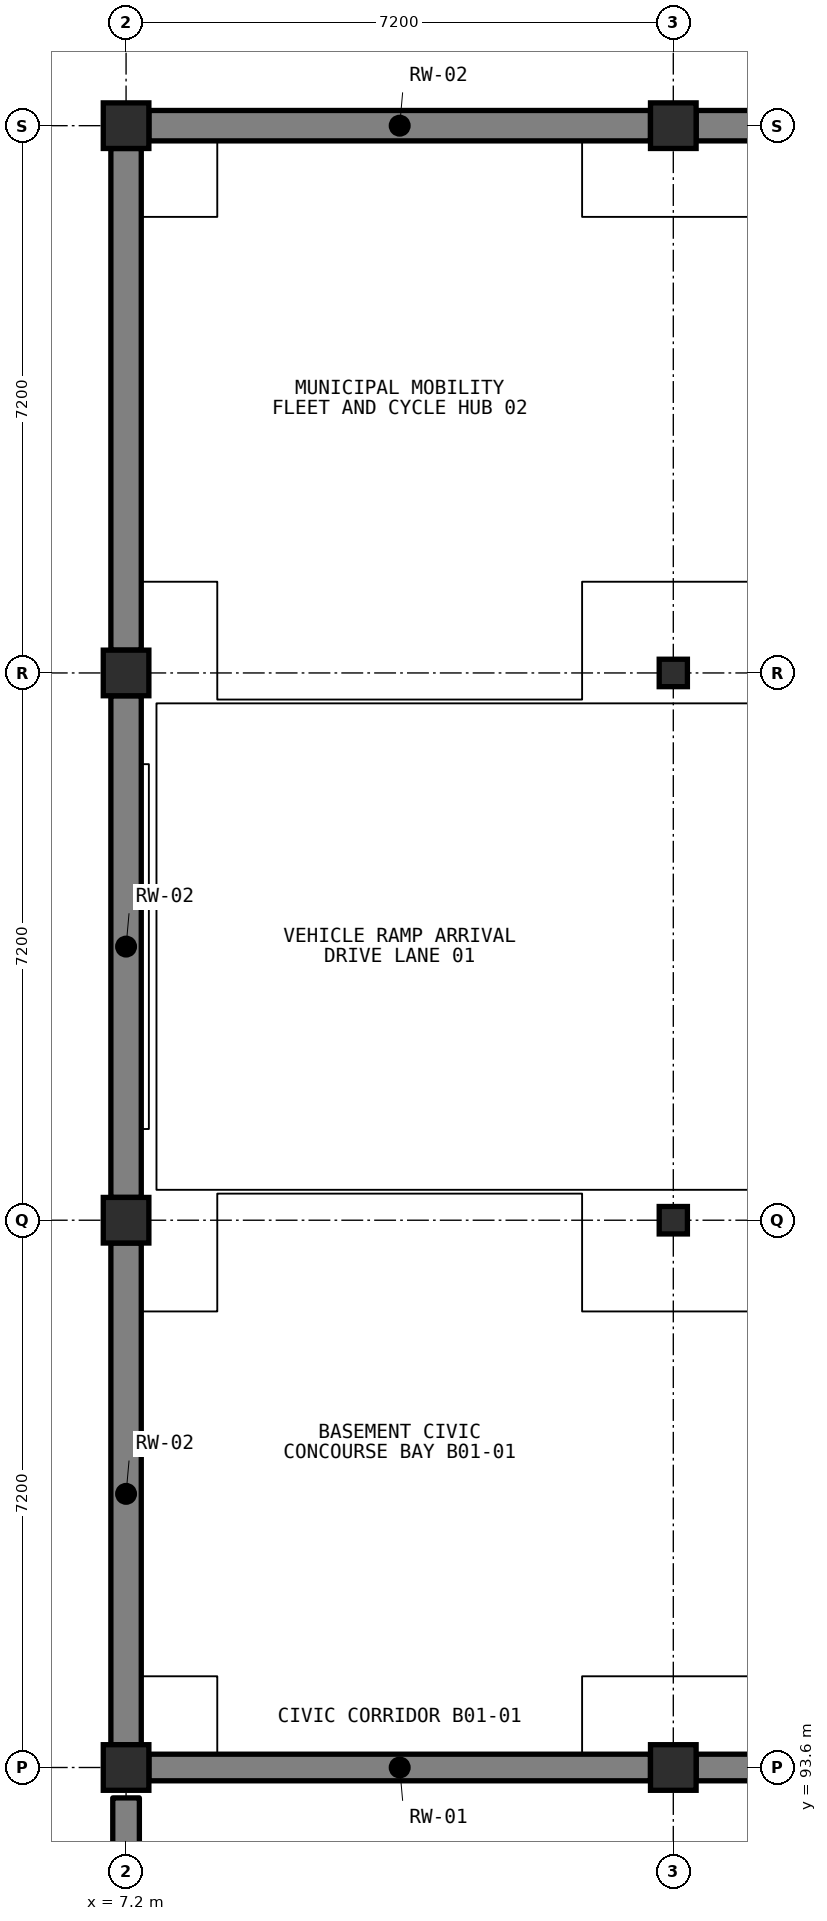
"""IFC4 building model, lengths in metres.
Left out: names, types, materials, properties, quantities, classifications, styles, units other than length and angle.
Written with IfcOpenShell. Run it as: python <this file> out.ifc"""

import sys

from ifc_helpers import new_model, si_unit, direction, frame, frame_2d, origin, origin_2d, place, context, subcontext, project, spatial, rectangle, i_section, extrude, element, save


model = new_model("IFC4")
c1 = context("Model", 3, precision=1e-05, world=origin(), true_north=direction((0.0, 1.0)))
c2 = subcontext(c1, "Body", "Model", "MODEL_VIEW")
j1 = project(units=[si_unit("LENGTHUNIT", "METRE"), si_unit("PLANEANGLEUNIT", "RADIAN")], contexts=[c1])
p1 = place(None, origin())
s1 = spatial("IfcSite", under=j1, at=p1, CompositionType="ELEMENT")
p2 = place(p1, origin())
s2 = spatial("IfcBuilding", under=s1, at=p2, CompositionType="ELEMENT")
p3 = place(p2, frame((0.0, 0.0, -4.2)))
s3 = spatial("IfcBuildingStorey", under=s2, at=p3, CompositionType="ELEMENT", Elevation=-4.2)
p4 = place(p3, frame((7.5, 93.6, 0.0), z_axis=(0.0, 0.0, 1.0), x_axis=(1.0, 0.0, 0.0)))
e1 = element("IfcWall", 1, at=p4, inside=s3, PredefinedType="USERDEFINED", context=c2, shape_type="SweptSolid", body=[
    extrude(rectangle(XDim=6.6, YDim=0.35, at=frame_2d((3.3, 0.0))), origin(), (0.0, 0.0, 1.0), 3.98),
])
p5 = place(p3, frame((7.2, 93.9, 0.0), z_axis=(0.0, 0.0, 1.0), x_axis=(0.0, 1.0, 0.0)))
e2 = element("IfcWall", 2, at=p5, inside=s3, PredefinedType="USERDEFINED", context=c2, shape_type="SweptSolid", body=[
    extrude(rectangle(XDim=6.6, YDim=0.4, at=frame_2d((3.3, 0.0))), origin(), (0.0, 0.0, 1.0), 3.98),
])
p6 = place(p3, frame((7.2, 101.1, 0.0), z_axis=(0.0, 0.0, 1.0), x_axis=(0.0, 1.0, 0.0)))
e3 = element("IfcWall", 3, at=p6, inside=s3, PredefinedType="USERDEFINED", context=c2, shape_type="SweptSolid", body=[
    extrude(rectangle(XDim=6.6, YDim=0.4, at=frame_2d((3.3, 0.0))), origin(), (0.0, 0.0, 1.0), 3.98),
])
p7 = place(p3, frame((7.5, 115.2, 0.0), z_axis=(0.0, 0.0, 1.0), x_axis=(1.0, 0.0, 0.0)))
e4 = element("IfcWall", 4, at=p7, inside=s3, PredefinedType="USERDEFINED", context=c2, shape_type="SweptSolid", body=[
    extrude(rectangle(XDim=6.6, YDim=0.4, at=frame_2d((3.3, 0.0))), origin(), (0.0, 0.0, 1.0), 3.98),
])
p8 = place(p3, frame((7.2, 108.3, 0.0), z_axis=(0.0, 0.0, 1.0), x_axis=(0.0, 1.0, 0.0)))
e5 = element("IfcWall", 5, at=p8, inside=s3, PredefinedType="USERDEFINED", context=c2, shape_type="SweptSolid", body=[
    extrude(rectangle(XDim=6.6, YDim=0.4, at=frame_2d((3.3, 0.0))), origin(), (0.0, 0.0, 1.0), 3.98),
])
p9 = place(p3, frame((14.7, 93.6, 0.0), z_axis=(0.0, 0.0, 1.0), x_axis=(1.0, 0.0, 0.0)))
e6 = element("IfcWall", 6, at=p9, inside=s3, PredefinedType="USERDEFINED", context=c2, shape_type="SweptSolid", body=[
    extrude(rectangle(XDim=6.6, YDim=0.35, at=frame_2d((3.3, 0.0))), origin(), (0.0, 0.0, 1.0), 3.98),
])
p10 = place(p3, frame((14.7, 115.2, 0.0), z_axis=(0.0, 0.0, 1.0), x_axis=(1.0, 0.0, 0.0)))
e7 = element("IfcWall", 7, at=p10, inside=s3, PredefinedType="USERDEFINED", context=c2, shape_type="SweptSolid", body=[
    extrude(rectangle(XDim=6.6, YDim=0.4, at=frame_2d((3.3, 0.0))), origin(), (0.0, 0.0, 1.0), 3.98),
])
p11 = place(p3, frame((7.2, 86.8, 0.0), z_axis=(0.0, 0.0, 1.0), x_axis=(0.0, 1.0, 0.0)))
e8 = element("IfcWall", 8, at=p11, inside=s3, PredefinedType="USERDEFINED", context=c2, shape_type="SweptSolid", body=[
    extrude(rectangle(XDim=6.4, YDim=0.35, at=frame_2d((3.2, 0.0))), origin(), (0.0, 0.0, 1.0), 3.98),
])
for number, where, z_axis, x_axis in (
    (9, (7.2, 93.6, 0.0), (0.0, 0.0, 1.0), (1.0, 0.0, 0.0)),
    (10, (7.2, 100.8, 0.0), (0.0, 0.0, 1.0), (1.0, 0.0, 0.0)),
    (11, (7.2, 108.0, 0.0), (0.0, 0.0, 1.0), (1.0, 0.0, 0.0)),
    (12, (7.2, 115.2, 0.0), (0.0, 0.0, 1.0), (1.0, 0.0, 0.0)),
    (13, (14.4, 93.6, 0.0), (0.0, 0.0, 1.0), (1.0, 0.0, 0.0)),
):
    element("IfcColumn", number, at=place(p3, frame(where, z_axis=z_axis, x_axis=x_axis)), inside=s3, PredefinedType="COLUMN", context=c2, shape_type="SweptSolid", body=[
        extrude(rectangle(XDim=0.6, YDim=0.6, at=origin_2d()), origin(), (0.0, 0.0, 1.0), 4.2),
    ])
for number, where, z_axis, x_axis in (
    (14, (14.4, 100.8, 0.0), (0.0, 0.0, 1.0), (1.0, 0.0, 0.0)),
    (15, (14.4, 108.0, 0.0), (0.0, 0.0, 1.0), (1.0, 0.0, 0.0)),
):
    element("IfcColumn", number, at=place(p3, frame(where, z_axis=z_axis, x_axis=x_axis)), inside=s3, PredefinedType="COLUMN", context=c2, shape_type="SweptSolid", body=[
        extrude(i_section(OverallWidth=0.371, OverallDepth=0.361, WebThickness=0.012, FlangeThickness=0.02, FilletRadius=0.015, at=origin_2d()), origin(), (0.0, 0.0, 1.0), 4.2),
    ])
p12 = place(p3, frame((14.4, 115.2, 0.0), z_axis=(0.0, 0.0, 1.0), x_axis=(1.0, 0.0, 0.0)))
e16 = element("IfcColumn", 16, at=p12, inside=s3, PredefinedType="COLUMN", context=c2, shape_type="SweptSolid", body=[
    extrude(rectangle(XDim=0.6, YDim=0.6, at=origin_2d()), origin(), (0.0, 0.0, 1.0), 4.2),
])
save(model, sys.argv[1])
